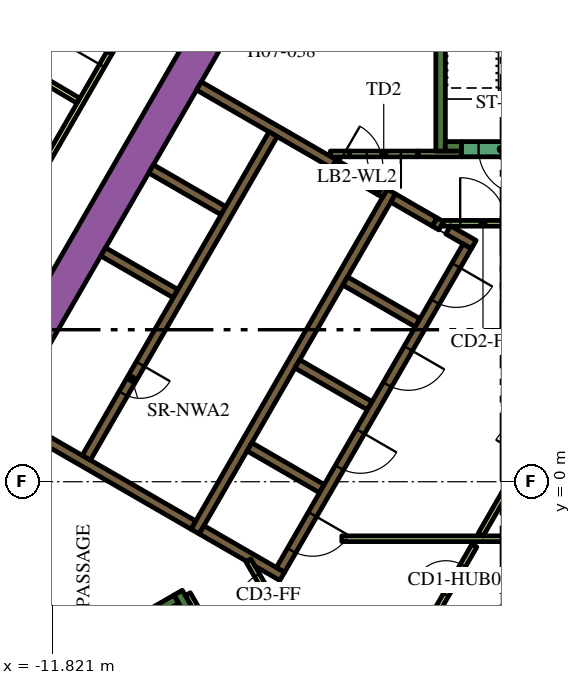
"""IFC4 building model, lengths in metres.
Left out: names, types, materials, properties, quantities, classifications, styles, units other than length and angle.
Written with IfcOpenShell. Run it as: python <this file> out.ifc"""

import sys

from ifc_helpers import new_model, si_unit, direction, frame, frame_2d, origin, place, context, subcontext, project, spatial, polyline, rectangle, outline, extrude, element, fill, save


model = new_model("IFC4")
c1 = context("Model", 3, precision=1e-05, world=origin(), true_north=direction((0.0, 1.0)))
c2 = subcontext(c1, "Body", "Model", "MODEL_VIEW")
j1 = project(units=[si_unit("LENGTHUNIT", "METRE"), si_unit("PLANEANGLEUNIT", "RADIAN")], contexts=[c1])
p1 = place(None, origin())
s1 = spatial("IfcSite", under=j1, at=p1, CompositionType="ELEMENT")
p2 = place(p1, origin())
s2 = spatial("IfcBuilding", under=s1, at=p2, CompositionType="ELEMENT")
p3 = place(p2, frame((0.0, 0.0, 99.3)))
s3 = spatial("IfcBuildingStorey", under=s2, at=p3, CompositionType="ELEMENT", Elevation=99.3)
p4 = place(p3, frame((-15.36, -1.503, 0.0), z_axis=(0.0, 0.0, 1.0), x_axis=(0.50000389221, 0.866023156604, 0.0)))
e1 = element("IfcWall", 1, at=p4, inside=s3, PredefinedType="SOLIDWALL", context=c2, shape_type="SweptSolid", body=[
    extrude(rectangle(XDim=21.0, YDim=0.9, at=frame_2d((10.5, 0.0))), origin(), (0.0, 0.0, 1.0), 3.9),
])
p5 = place(p3, frame((-1.6, 8.7, 0.0), z_axis=(0.0, 0.0, 1.0), x_axis=(0.0, 1.0, 0.0)))
e2 = element("IfcWall", 2, at=p5, inside=s3, PredefinedType="SOLIDWALL", context=c2, shape_type="SweptSolid", body=[
    extrude(rectangle(XDim=7.05, YDim=0.25, at=frame_2d((3.525, 0.0))), origin(), (0.0, 0.0, 1.0), 3.9),
])
p6 = place(p3, frame((-1.475, 8.825, 0.0), z_axis=(0.0, 0.0, 1.0), x_axis=(1.0, 0.0, 0.0)))
e3 = element("IfcWall", 3, at=p6, inside=s3, PredefinedType="SOLIDWALL", context=c2, shape_type="SweptSolid", body=[
    extrude(rectangle(XDim=0.425, YDim=0.25, at=frame_2d((0.212, 0.0))), origin(), (0.0, 0.0, 1.0), 3.9),
])
p7 = place(p3, frame((-14.44, -6.49, 0.0), z_axis=(0.0, 0.0, 1.0), x_axis=(0.866022966069, 0.500004222222, 0.0)))
e4 = element("IfcWall", 4, at=p7, inside=s3, PredefinedType="SOLIDWALL", context=c2, shape_type="SweptSolid", body=[
    extrude(rectangle(XDim=6.8, YDim=0.25, at=frame_2d((3.4, 0.0))), origin(), (0.0, 0.0, 1.0), 3.9),
])
p8 = place(p3, frame((-8.168, -3.503, 0.0), z_axis=(0.0, 0.0, 1.0), x_axis=(-0.499952099219, 0.866053057547, 0.0)))
e5 = element("IfcWall", 5, at=p8, inside=s3, PredefinedType="SOLIDWALL", context=c2, shape_type="SweptSolid", body=[
    extrude(rectangle(XDim=0.675, YDim=0.25, at=frame_2d((0.337, 0.0))), origin(), (0.0, 0.0, 1.0), 3.9),
])
p9 = place(p3, frame((-8.06, -1.311, 0.0), z_axis=(0.0, 0.0, 1.0), x_axis=(0.50000273126, 0.866023826885, 0.0)))
e6 = element("IfcWall", 6, at=p9, inside=s3, PredefinedType="SOLIDWALL", context=c2, shape_type="SweptSolid", body=[
    extrude(rectangle(XDim=10.33, YDim=0.25, at=frame_2d((5.165, 0.0))), origin(), (0.0, 0.0, 1.0), 3.9),
])
p10 = place(p3, frame((-1.758, 6.835, 0.0), z_axis=(0.0, 0.0, 1.0), x_axis=(0.865982457891, -0.500074377092, 0.0)))
e7 = element("IfcWall", 7, at=p10, inside=s3, PredefinedType="SOLIDWALL", context=c2, shape_type="SweptSolid", body=[
    extrude(rectangle(XDim=0.2, YDim=0.25, at=frame_2d((0.1, 0.0))), origin(), (0.0, 0.0, 1.0), 3.9),
])
p11 = place(p3, frame((-1.76, 6.836, 0.0), z_axis=(0.0, 0.0, 1.0), x_axis=(-0.865952863304, 0.500125622755, 0.0)))
e8 = element("IfcWall", 8, at=p11, inside=s3, PredefinedType="SOLIDWALL", context=c2, shape_type="SweptSolid", body=[
    extrude(rectangle(XDim=1.258, YDim=0.25, at=frame_2d((0.629, 0.0))), origin(), (0.0, 0.0, 1.0), 3.9),
])
p12 = place(p3, frame((-0.728, 6.24, 0.0), z_axis=(0.0, 0.0, 1.0), x_axis=(-0.865955664968, 0.500120771724, 0.0)))
e9 = element("IfcWall", 9, at=p12, inside=s3, PredefinedType="SOLIDWALL", context=c2, shape_type="SweptSolid", body=[
    extrude(rectangle(XDim=0.778, YDim=0.25, at=frame_2d((0.389, 0.0))), origin(), (0.0, 0.0, 1.0), 3.9),
])
for number, where, z_axis, x_axis in (
    (10, (-2.204, 4.182, 0.0), (0.0, 0.0, 1.0), (-0.866, 0.5, 0.0)),
    (11, (-5.369, 3.1, 0.0), (0.0, 0.0, 1.0), (0.866, -0.5, 0.0)),
    (12, (-4.724, -0.182, 0.0), (0.0, 0.0, 1.0), (-0.866, 0.5, 0.0)),
):
    element("IfcWall", number, at=place(p3, frame(where, z_axis=z_axis, x_axis=x_axis)), inside=s3, PredefinedType="SOLIDWALL", context=c2, shape_type="SweptSolid", body=[
        extrude(rectangle(XDim=2.2, YDim=0.25, at=frame_2d((1.1, 0.0))), origin(), (0.0, 0.0, 1.0), 3.9),
    ])
p13 = place(p3, origin())
e13 = element("IfcWall", 13, at=p13, inside=s3, PredefinedType="SOLIDWALL", context=c2, shape_type="SweptSolid", body=[
    extrude(outline(polyline([(-5.922, -2.257), (-5.922, -2.257), (-5.705, -2.382), (-5.83, -2.598), (-6.483, -2.221), (-6.591, -2.033), (-6.591, -2.033), (-6.7, -2.096), (-7.952, -1.373), (-7.827, -1.156), (-5.922, -2.257)])), origin(), (0.0, 0.0, 1.0), 3.9),
])
p14 = place(p3, frame((-8.106, -1.14, 0.0), z_axis=(0.0, 0.0, 1.0), x_axis=(-0.866000643155, 0.500042884217, 0.0)))
e14 = element("IfcWall", 14, at=p14, inside=s3, PredefinedType="SOLIDWALL", context=c2, shape_type="SweptSolid", body=[
    extrude(rectangle(XDim=5.65, YDim=0.25, at=frame_2d((2.825, 0.0))), origin(), (0.0, 0.0, 1.0), 3.9),
])
e15 = element("IfcWall", 15, at=p13, inside=s3, PredefinedType="SOLIDWALL", context=c2, shape_type="SweptSolid", body=[
    extrude(outline(polyline([(-3.128, 7.481), (-3.259, 7.557), (-3.134, 7.773), (-3.003, 7.698), (-3.128, 7.481)])), origin(), (0.0, 0.0, 1.0), 3.9),
])
for number, where, z_axis, x_axis in (
    (16, (-8.574, 4.95, 0.0), (0.0, 0.0, 1.0), (-0.866, 0.5, 0.0)),
    (17, (-7.314, 7.132, 0.0), (0.0, 0.0, 1.0), (-0.866, 0.5, 0.0)),
):
    element("IfcWall", number, at=place(p3, frame(where, z_axis=z_axis, x_axis=x_axis)), inside=s3, PredefinedType="SOLIDWALL", context=c2, shape_type="SweptSolid", body=[
        extrude(rectangle(XDim=2.2, YDim=0.25, at=frame_2d((1.1, 0.0))), origin(), (0.0, 0.0, 1.0), 3.9),
    ])
p15 = place(p3, frame((-7.959, 10.415, 0.0), z_axis=(0.0, 0.0, 1.0), x_axis=(0.866020958405, -0.500007699544, 0.0)))
e18 = element("IfcWall", 18, at=p15, inside=s3, PredefinedType="SOLIDWALL", context=c2, shape_type="SweptSolid", body=[
    extrude(rectangle(XDim=4.1, YDim=0.25, at=frame_2d((2.05, 0.0))), origin(), (0.0, 0.0, 1.0), 3.9),
])
p16 = place(p3, frame((-8.252, -2.958, 0.0), z_axis=(0.0, 0.0, 1.0), x_axis=(0.500174715838, -0.865924508047, 0.0)))
e19 = element("IfcWall", 19, at=p16, inside=s3, PredefinedType="PARTITIONING", context=c2, shape_type="SweptSolid", body=[
    extrude(rectangle(XDim=0.514, YDim=0.15, at=frame_2d((0.257, 0.0))), origin(), (0.0, 0.0, 1.0), 2.75),
])
p17 = place(p3, frame((-3.997, 8.625, 0.0), z_axis=(0.0, 0.0, 1.0), x_axis=(-1.0, 0.0, 0.0)))
e20 = element("IfcWall", 20, at=p17, inside=s3, PredefinedType="PARTITIONING", context=c2, shape_type="SweptSolid", body=[
    extrude(rectangle(XDim=0.502, YDim=0.15, at=frame_2d((0.251, 0.0))), origin(), (0.0, 0.0, 1.0), 2.75),
])
p18 = place(p3, frame((-2.196, 8.625, 0.0), z_axis=(0.0, 0.0, 1.0), x_axis=(1.0, 0.0, 0.0)))
e21 = element("IfcWall", 21, at=p18, inside=s3, PredefinedType="PARTITIONING", context=c2, shape_type="SweptSolid", body=[
    extrude(rectangle(XDim=1.146, YDim=0.15, at=frame_2d((0.573, 0.0))), origin(), (0.0, 0.0, 1.0), 2.75),
])
p19 = place(p3, frame((-4.2, -1.5, 0.0), z_axis=(0.0, 0.0, 1.0), x_axis=(1.0, 0.0, 0.0)))
e22 = element("IfcWall", 22, at=p19, inside=s3, PredefinedType="PARTITIONING", context=c2, shape_type="SweptSolid", body=[
    extrude(rectangle(XDim=9.359, YDim=0.15, at=frame_2d((4.68, 0.0))), origin(), (0.0, 0.0, 1.0), 2.75),
])
p20 = place(p3, frame((-0.544, -1.393, 0.0), z_axis=(0.0, 0.0, 1.0), x_axis=(0.499928740635, 0.866066541489, 0.0)))
e23 = element("IfcWall", 23, at=p20, inside=s3, PredefinedType="PARTITIONING", context=c2, shape_type="SweptSolid", body=[
    extrude(rectangle(XDim=1.912, YDim=0.15, at=frame_2d((0.956, 0.0))), origin(), (0.0, 0.0, 1.0), 2.75),
])
p21 = place(p3, frame((-6.008, 9.144, 0.0), z_axis=(0.0, 0.0, 1.0), x_axis=(-0.500006956611, -0.866021387346, 0.0)))
e24 = element("IfcWall", 24, at=p21, inside=s3, PredefinedType="SOLIDWALL", context=c2, shape_type="SweptSolid", body=[
    extrude(rectangle(XDim=9.83, YDim=0.25, at=frame_2d((4.915, 0.0))), origin(), (0.0, 0.0, 1.0), 3.9),
])
p22 = place(p21, frame((6.985, 0.0, 0.0)))
e25 = element("IfcOpeningElement", 25, at=p22, cuts=e24, PredefinedType="OPENING", context=c2, shape_type="SweptSolid", body=[
    extrude(rectangle(XDim=0.9, YDim=2.1, at=frame_2d((0.45, 1.05))), frame((0.0, 0.135, 0.0), z_axis=(0.0, -1.0, 0.0), x_axis=(1.0, 0.0, 0.0)), (0.0, 0.0, 1.0), 0.27),
])
p23 = place(p3, frame((-0.898, 6.194, 0.0), z_axis=(0.0, 0.0, 1.0), x_axis=(-0.499996202215, -0.866027596426, 0.0)))
e26 = element("IfcWall", 26, at=p23, inside=s3, PredefinedType="SOLIDWALL", context=c2, shape_type="SweptSolid", body=[
    extrude(rectangle(XDim=9.83, YDim=0.25, at=frame_2d((4.915, 0.0))), origin(), (0.0, 0.0, 1.0), 3.9),
])
p24 = place(p23, frame((0.585, 0.0, 0.0)))
e27 = element("IfcOpeningElement", 27, at=p24, cuts=e26, PredefinedType="OPENING", context=c2, shape_type="SweptSolid", body=[
    extrude(rectangle(XDim=1.1, YDim=2.1, at=frame_2d((0.55, 1.05))), frame((0.0, 0.135, 0.0), z_axis=(0.0, -1.0, 0.0), x_axis=(1.0, 0.0, 0.0)), (0.0, 0.0, 1.0), 0.27),
])
p25 = place(p23, frame((3.105, 0.0, 0.0)))
e28 = element("IfcOpeningElement", 28, at=p25, cuts=e26, PredefinedType="OPENING", context=c2, shape_type="SweptSolid", body=[
    extrude(rectangle(XDim=1.1, YDim=2.1, at=frame_2d((0.55, 1.05))), frame((0.0, 0.135, 0.0), z_axis=(0.0, -1.0, 0.0), x_axis=(1.0, 0.0, 0.0)), (0.0, 0.0, 1.0), 0.27),
])
p26 = place(p23, frame((5.625, 0.0, 0.0)))
e29 = element("IfcOpeningElement", 29, at=p26, cuts=e26, PredefinedType="OPENING", context=c2, shape_type="SweptSolid", body=[
    extrude(rectangle(XDim=1.1, YDim=2.1, at=frame_2d((0.55, 1.05))), frame((0.0, 0.135, 0.0), z_axis=(0.0, -1.0, 0.0), x_axis=(1.0, 0.0, 0.0)), (0.0, 0.0, 1.0), 0.27),
])
p27 = place(p23, frame((8.145, 0.0, 0.0)))
e30 = element("IfcOpeningElement", 30, at=p27, cuts=e26, PredefinedType="OPENING", context=c2, shape_type="SweptSolid", body=[
    extrude(rectangle(XDim=1.1, YDim=2.1, at=frame_2d((0.55, 1.05))), frame((0.0, 0.135, 0.0), z_axis=(0.0, -1.0, 0.0), x_axis=(1.0, 0.0, 0.0)), (0.0, 0.0, 1.0), 0.27),
])
p28 = place(p3, frame((1.05, 8.75, 0.0), z_axis=(0.0, 0.0, 1.0), x_axis=(-1.0, 0.0, 0.0)))
e31 = element("IfcWall", 31, at=p28, inside=s3, PredefinedType="SOLIDWALL", context=c2, shape_type="SweptSolid", body=[
    extrude(rectangle(XDim=2.1, YDim=0.4, at=frame_2d((1.05, 0.0))), origin(), (0.0, 0.0, 1.0), 3.9),
])
p29 = place(p28, frame((0.45, 0.0, 0.0)))
e32 = element("IfcOpeningElement", 32, at=p29, cuts=e31, PredefinedType="OPENING", context=c2, shape_type="SweptSolid", body=[
    extrude(rectangle(XDim=1.2, YDim=2.1, at=frame_2d((0.6, 1.05))), frame((0.0, 0.21, 0.0), z_axis=(0.0, -1.0, 0.0), x_axis=(1.0, 0.0, 0.0)), (0.0, 0.0, 1.0), 0.42),
])
p30 = place(p3, frame((-2.196, 8.625, 0.0), z_axis=(0.0, 0.0, 1.0), x_axis=(-1.0, 0.0, 0.0)))
e33 = element("IfcWall", 33, at=p30, inside=s3, PredefinedType="PARTITIONING", context=c2, shape_type="SweptSolid", body=[
    extrude(rectangle(XDim=1.8, YDim=0.15, at=frame_2d((0.9, 0.0))), origin(), (0.0, 0.0, 1.0), 2.75),
])
p31 = place(p30, frame((0.45, 0.0, 0.0)))
e34 = element("IfcOpeningElement", 34, at=p31, cuts=e33, PredefinedType="OPENING", context=c2, shape_type="SweptSolid", body=[
    extrude(rectangle(XDim=0.9, YDim=2.1, at=frame_2d((0.45, 1.05))), frame((0.0, 0.085, 0.0), z_axis=(0.0, -1.0, 0.0), x_axis=(1.0, 0.0, 0.0)), (0.0, 0.0, 1.0), 0.17),
])
p32 = place(p3, frame((-1.76, -3.498, 0.0), z_axis=(0.0, 0.0, 1.0), x_axis=(0.499977374825, 0.866038466041, 0.0)))
e35 = element("IfcWall", 35, at=p32, inside=s3, PredefinedType="PARTITIONING", context=c2, shape_type="SweptSolid", body=[
    extrude(rectangle(XDim=2.1, YDim=0.15, at=frame_2d((1.05, 0.0))), origin(), (0.0, 0.0, 1.0), 2.75),
])
p33 = place(p32, frame((0.6, 0.0, 0.0)))
e36 = element("IfcOpeningElement", 36, at=p33, cuts=e35, PredefinedType="OPENING", context=c2, shape_type="SweptSolid", body=[
    extrude(rectangle(XDim=0.9, YDim=2.1, at=frame_2d((0.45, 1.05))), frame((0.0, 0.085, 0.0), z_axis=(0.0, -1.0, 0.0), x_axis=(1.0, 0.0, 0.0)), (0.0, 0.0, 1.0), 0.17),
])
p34 = place(p3, frame((-1.534, 6.8, 0.0), z_axis=(0.0, 0.0, 1.0), x_axis=(1.0, 0.0, 0.0)))
e37 = element("IfcWall", 37, at=p34, inside=s3, PredefinedType="PARTITIONING", context=c2, shape_type="SweptSolid", body=[
    extrude(rectangle(XDim=2.1, YDim=0.15, at=frame_2d((1.05, 0.0))), origin(), (0.0, 0.0, 1.0), 2.75),
])
p35 = place(p34, frame((0.45, 0.0, 0.0)))
e38 = element("IfcOpeningElement", 38, at=p35, cuts=e37, PredefinedType="OPENING", context=c2, shape_type="SweptSolid", body=[
    extrude(rectangle(XDim=1.2, YDim=2.1, at=frame_2d((0.6, 1.05))), frame((0.0, 0.085, 0.0), z_axis=(0.0, -1.0, 0.0), x_axis=(1.0, 0.0, 0.0)), (0.0, 0.0, 1.0), 0.17),
])
p36 = place(p3, frame((-5.606, -3.89, 0.0), z_axis=(0.0, 0.0, 1.0), x_axis=(-0.500027713859, 0.866009402589, 0.0)))
e39 = element("IfcWall", 39, at=p36, inside=s3, PredefinedType="PARTITIONING", context=c2, shape_type="SweptSolid", body=[
    extrude(rectangle(XDim=2.1, YDim=0.15, at=frame_2d((1.05, 0.0))), origin(), (0.0, 0.0, 1.0), 2.75),
])
p37 = place(p36, frame((0.45, 0.0, 0.0)))
e40 = element("IfcOpeningElement", 40, at=p37, cuts=e39, PredefinedType="OPENING", context=c2, shape_type="SweptSolid", body=[
    extrude(rectangle(XDim=1.2, YDim=2.1, at=frame_2d((0.6, 1.05))), frame((0.0, 0.085, 0.0), z_axis=(0.0, -1.0, 0.0), x_axis=(1.0, 0.0, 0.0)), (0.0, 0.0, 1.0), 0.17),
])
p38 = place(p3, frame((-4.409, 8.365, 0.0), z_axis=(0.0, 0.0, 1.0), x_axis=(0.866034573852, -0.49998411664, 0.0)))
e41 = element("IfcWall", 41, at=p38, inside=s3, PredefinedType="SOLIDWALL", context=c2, shape_type="SweptSolid", body=[
    extrude(rectangle(XDim=1.4, YDim=0.25, at=frame_2d((0.7, 0.0))), origin(), (0.0, 0.0, 1.0), 3.9),
])
p39 = place(p38, frame((0.1, 0.0, 0.0)))
e42 = element("IfcOpeningElement", 42, at=p39, cuts=e41, PredefinedType="OPENING", context=c2, shape_type="SweptSolid", body=[
    extrude(rectangle(XDim=1.2, YDim=2.1, at=frame_2d((0.6, 1.05))), frame((0.0, 0.135, 0.0), z_axis=(0.0, -1.0, 0.0), x_axis=(1.0, 0.0, 0.0)), (0.0, 0.0, 1.0), 0.27),
])
p40 = place(p3, frame((-19.081, -3.9, 0.0), z_axis=(0.0, 0.0, 1.0), x_axis=(0.499998313975, 0.866026377209, 0.0)))
e43 = element("IfcWall", 43, at=p40, inside=s3, PredefinedType="PARTITIONING", context=c2, shape_type="SweptSolid", body=[
    extrude(rectangle(XDim=25.766, YDim=0.15, at=frame_2d((12.883, 0.0))), origin(), (0.0, 0.0, 1.0), 2.75),
])
p41 = place(p40, frame((19.306, 0.0, 0.0)))
e44 = element("IfcOpeningElement", 44, at=p41, cuts=e43, PredefinedType="OPENING", context=c2, shape_type="SweptSolid", body=[
    extrude(rectangle(XDim=1.0, YDim=2.1, at=frame_2d((0.5, 1.05))), frame((0.0, 0.085, 0.0), z_axis=(0.0, -1.0, 0.0), x_axis=(1.0, 0.0, 0.0)), (0.0, 0.0, 1.0), 0.17),
])
p42 = place(p40, frame((17.144, 0.0, 0.0)))
e45 = element("IfcOpeningElement", 45, at=p42, cuts=e43, PredefinedType="OPENING", context=c2, shape_type="SweptSolid", body=[
    extrude(rectangle(XDim=0.9, YDim=2.1, at=frame_2d((0.45, 1.05))), frame((0.0, 0.085, 0.0), z_axis=(0.0, -1.0, 0.0), x_axis=(1.0, 0.0, 0.0)), (0.0, 0.0, 1.0), 0.17),
])
p43 = place(p40, frame((9.955, 0.0, 0.0)))
e46 = element("IfcOpeningElement", 46, at=p43, cuts=e43, PredefinedType="OPENING", context=c2, shape_type="SweptSolid", body=[
    extrude(rectangle(XDim=1.1, YDim=2.1, at=frame_2d((0.55, 1.05))), frame((0.0, 0.085, 0.0), z_axis=(0.0, -1.0, 0.0), x_axis=(1.0, 0.0, 0.0)), (0.0, 0.0, 1.0), 0.17),
])
p44 = place(p40, frame((8.648, 0.0, 0.0)))
e47 = element("IfcOpeningElement", 47, at=p44, cuts=e43, PredefinedType="OPENING", context=c2, shape_type="SweptSolid", body=[
    extrude(rectangle(XDim=1.0, YDim=2.1, at=frame_2d((0.5, 1.05))), frame((0.0, 0.085, 0.0), z_axis=(0.0, -1.0, 0.0), x_axis=(1.0, 0.0, 0.0)), (0.0, 0.0, 1.0), 0.17),
])
p45 = place(p40, frame((1.553, 0.0, 0.0)))
e48 = element("IfcOpeningElement", 48, at=p45, cuts=e43, PredefinedType="OPENING", context=c2, shape_type="SweptSolid", body=[
    extrude(rectangle(XDim=0.9, YDim=2.1, at=frame_2d((0.45, 1.05))), frame((0.0, 0.085, 0.0), z_axis=(0.0, -1.0, 0.0), x_axis=(1.0, 0.0, 0.0)), (0.0, 0.0, 1.0), 0.17),
])
p46 = place(p3, frame((-17.379, 13.731, 0.0), z_axis=(0.0, 0.0, 1.0), x_axis=(0.860132461691, -0.510070728768, 0.0)))
e49 = element("IfcWall", 49, at=p46, inside=s3, PredefinedType="PARTITIONING", context=c2, shape_type="SweptSolid", body=[
    extrude(rectangle(XDim=7.257, YDim=0.15, at=frame_2d((3.628, 0.0))), origin(), (0.0, 0.0, 1.0), 2.75),
])
p47 = place(p22, origin())
e50 = element("IfcDoor", 50, at=p47, inside=s3, OperationType="SINGLE_SWING_LEFT", PredefinedType="DOOR", context=c2, shape_type="SweptSolid", body=[
    extrude(rectangle(XDim=0.9, YDim=2.1, at=frame_2d((0.45, 1.05))), frame((0.0, 0.025, 0.0), z_axis=(0.0, -1.0, 0.0), x_axis=(1.0, 0.0, 0.0)), (0.0, 0.0, 1.0), 0.05),
])
fill(e25, e50)
p48 = place(p24, origin())
e51 = element("IfcDoor", 51, at=p48, inside=s3, OperationType="DOUBLE_DOOR_SLIDING", PredefinedType="DOOR", context=c2, shape_type="SweptSolid", body=[
    extrude(rectangle(XDim=1.1, YDim=2.1, at=frame_2d((0.55, 1.05))), frame((0.0, 0.025, 0.0), z_axis=(0.0, -1.0, 0.0), x_axis=(1.0, 0.0, 0.0)), (0.0, 0.0, 1.0), 0.05),
])
fill(e27, e51)
p49 = place(p25, origin())
e52 = element("IfcDoor", 52, at=p49, inside=s3, OperationType="DOUBLE_DOOR_SLIDING", PredefinedType="DOOR", context=c2, shape_type="SweptSolid", body=[
    extrude(rectangle(XDim=1.1, YDim=2.1, at=frame_2d((0.55, 1.05))), frame((0.0, 0.025, 0.0), z_axis=(0.0, -1.0, 0.0), x_axis=(1.0, 0.0, 0.0)), (0.0, 0.0, 1.0), 0.05),
])
fill(e28, e52)
p50 = place(p26, origin())
e53 = element("IfcDoor", 53, at=p50, inside=s3, OperationType="DOUBLE_DOOR_SLIDING", PredefinedType="DOOR", context=c2, shape_type="SweptSolid", body=[
    extrude(rectangle(XDim=1.1, YDim=2.1, at=frame_2d((0.55, 1.05))), frame((0.0, 0.025, 0.0), z_axis=(0.0, -1.0, 0.0), x_axis=(1.0, 0.0, 0.0)), (0.0, 0.0, 1.0), 0.05),
])
fill(e29, e53)
p51 = place(p27, origin())
e54 = element("IfcDoor", 54, at=p51, inside=s3, OperationType="DOUBLE_DOOR_SLIDING", PredefinedType="DOOR", context=c2, shape_type="SweptSolid", body=[
    extrude(rectangle(XDim=1.1, YDim=2.1, at=frame_2d((0.55, 1.05))), frame((0.0, 0.025, 0.0), z_axis=(0.0, -1.0, 0.0), x_axis=(1.0, 0.0, 0.0)), (0.0, 0.0, 1.0), 0.05),
])
fill(e30, e54)
p52 = place(p29, origin())
e55 = element("IfcDoor", 55, at=p52, inside=s3, OperationType="SINGLE_SWING_LEFT", PredefinedType="DOOR", context=c2, shape_type="SweptSolid", body=[
    extrude(rectangle(XDim=1.2, YDim=2.1, at=frame_2d((0.6, 1.05))), frame((0.0, 0.025, 0.0), z_axis=(0.0, -1.0, 0.0), x_axis=(1.0, 0.0, 0.0)), (0.0, 0.0, 1.0), 0.05),
])
fill(e32, e55)
p53 = place(p31, origin())
e56 = element("IfcDoor", 56, at=p53, inside=s3, OperationType="SINGLE_SWING_LEFT", PredefinedType="DOOR", context=c2, shape_type="SweptSolid", body=[
    extrude(rectangle(XDim=0.9, YDim=2.1, at=frame_2d((0.45, 1.05))), frame((0.0, 0.025, 0.0), z_axis=(0.0, -1.0, 0.0), x_axis=(1.0, 0.0, 0.0)), (0.0, 0.0, 1.0), 0.05),
])
fill(e34, e56)
p54 = place(p33, origin())
e57 = element("IfcDoor", 57, at=p54, inside=s3, OperationType="SINGLE_SWING_LEFT", PredefinedType="DOOR", context=c2, shape_type="SweptSolid", body=[
    extrude(rectangle(XDim=0.9, YDim=2.1, at=frame_2d((0.45, 1.05))), frame((0.0, 0.025, 0.0), z_axis=(0.0, -1.0, 0.0), x_axis=(1.0, 0.0, 0.0)), (0.0, 0.0, 1.0), 0.05),
])
fill(e36, e57)
p55 = place(p35, origin())
e58 = element("IfcDoor", 58, at=p55, inside=s3, OperationType="SINGLE_SWING_LEFT", PredefinedType="DOOR", context=c2, shape_type="SweptSolid", body=[
    extrude(rectangle(XDim=1.2, YDim=2.1, at=frame_2d((0.6, 1.05))), frame((0.0, 0.025, 0.0), z_axis=(0.0, -1.0, 0.0), x_axis=(1.0, 0.0, 0.0)), (0.0, 0.0, 1.0), 0.05),
])
fill(e38, e58)
p56 = place(p37, origin())
e59 = element("IfcDoor", 59, at=p56, inside=s3, OperationType="SINGLE_SWING_LEFT", PredefinedType="DOOR", context=c2, shape_type="SweptSolid", body=[
    extrude(rectangle(XDim=1.2, YDim=2.1, at=frame_2d((0.6, 1.05))), frame((0.0, 0.025, 0.0), z_axis=(0.0, -1.0, 0.0), x_axis=(1.0, 0.0, 0.0)), (0.0, 0.0, 1.0), 0.05),
])
fill(e40, e59)
p57 = place(p39, origin())
e60 = element("IfcDoor", 60, at=p57, inside=s3, OperationType="SINGLE_SWING_LEFT", PredefinedType="DOOR", context=c2, shape_type="SweptSolid", body=[
    extrude(rectangle(XDim=1.2, YDim=2.1, at=frame_2d((0.6, 1.05))), frame((0.0, 0.025, 0.0), z_axis=(0.0, -1.0, 0.0), x_axis=(1.0, 0.0, 0.0)), (0.0, 0.0, 1.0), 0.05),
])
fill(e42, e60)
p58 = place(p42, origin())
e61 = element("IfcDoor", 61, at=p58, inside=s3, OperationType="SINGLE_SWING_LEFT", PredefinedType="DOOR", context=c2, shape_type="SweptSolid", body=[
    extrude(rectangle(XDim=0.9, YDim=2.1, at=frame_2d((0.45, 1.05))), frame((0.0, 0.025, 0.0), z_axis=(0.0, -1.0, 0.0), x_axis=(1.0, 0.0, 0.0)), (0.0, 0.0, 1.0), 0.05),
])
fill(e45, e61)
save(model, sys.argv[1])
